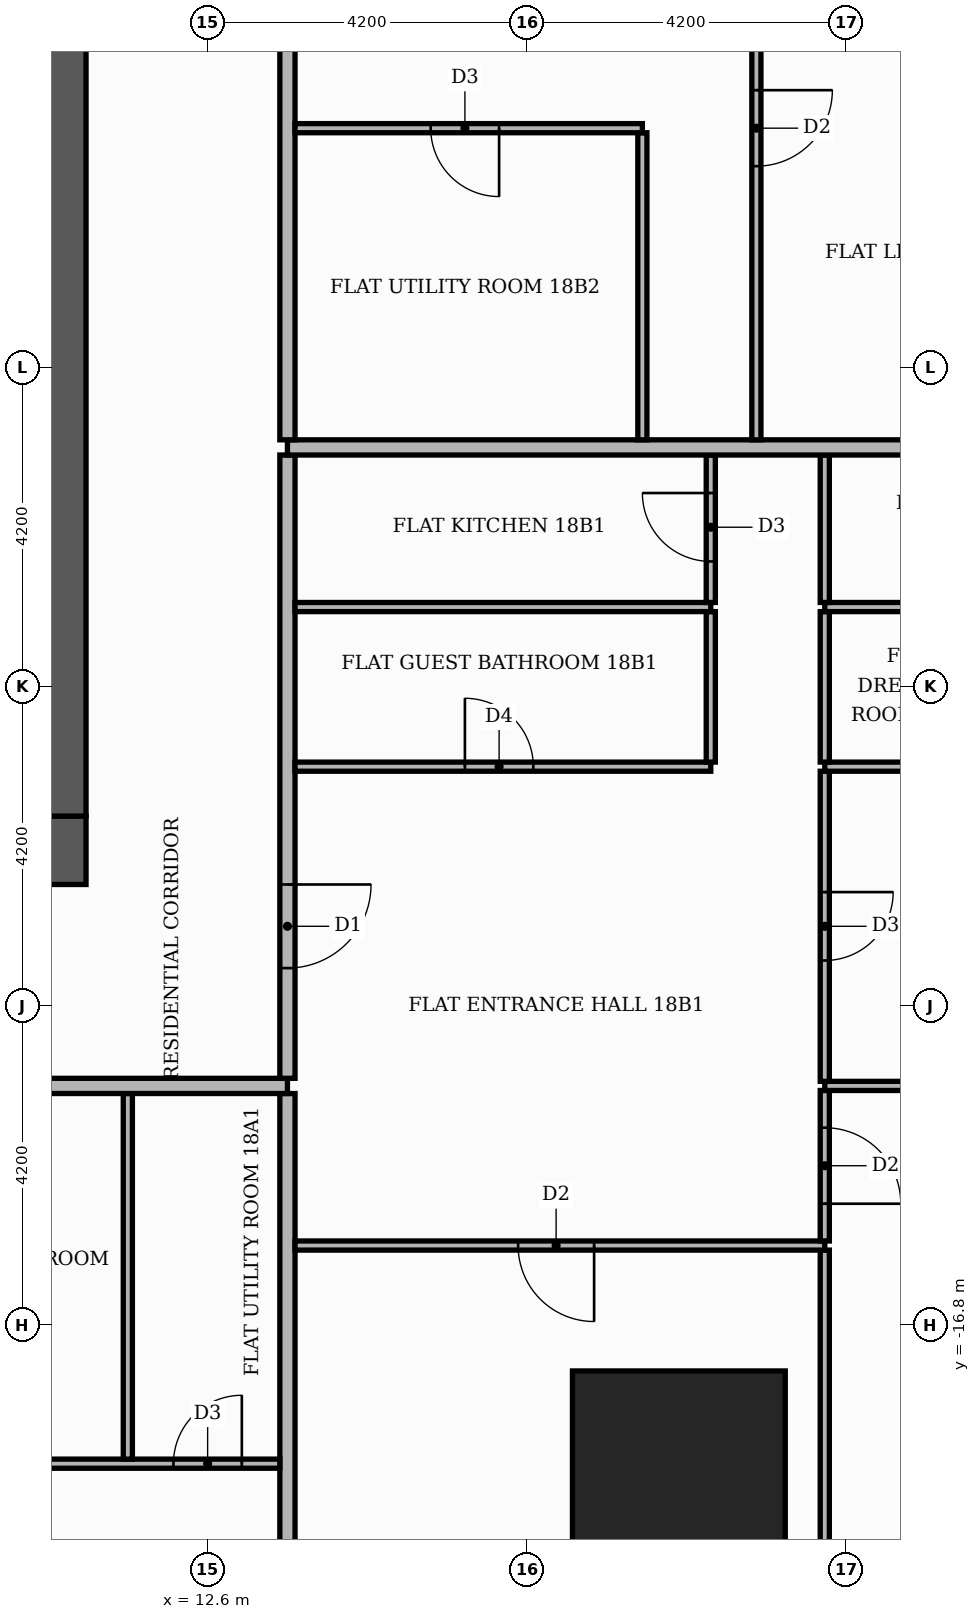
"""IFC4 building model, lengths in metres.
Left out: names, types, materials, properties, quantities, classifications, styles, units other than length and angle.
Written with IfcOpenShell. Run it as: python <this file> out.ifc"""

import sys

from ifc_helpers import new_model, si_unit, direction, frame, frame_2d, origin, origin_2d, place, context, subcontext, project, spatial, rectangle, extrude, element, fill, save


model = new_model("IFC4")
c1 = context("Model", 3, precision=1e-05, world=origin(), true_north=direction((0.0, 1.0)))
c2 = subcontext(c1, "Body", "Model", "MODEL_VIEW")
j1 = project(units=[si_unit("LENGTHUNIT", "METRE"), si_unit("PLANEANGLEUNIT", "RADIAN")], contexts=[c1])
p1 = place(None, origin())
s1 = spatial("IfcSite", under=j1, at=p1, CompositionType="ELEMENT")
p2 = place(p1, origin())
s2 = spatial("IfcBuilding", under=s1, at=p2, CompositionType="ELEMENT")
p3 = place(p2, frame((0.0, 0.0, 79.2)))
s3 = spatial("IfcBuildingStorey", under=s2, at=p3, CompositionType="ELEMENT", Elevation=79.2)
p4 = place(p3, frame((-11.0, -10.55, 0.0), z_axis=(0.0, 0.0, 1.0), x_axis=(1.0, 0.0, 0.0)))
e1 = element("IfcWall", 1, at=p4, inside=s3, PredefinedType="SHEAR", context=c2, shape_type="SweptSolid", body=[
    extrude(rectangle(XDim=22.0, YDim=0.9, at=frame_2d((11.0, 0.0))), origin(), (0.0, 0.0, 1.0), 3.48),
])
p5 = place(p4, frame((7.4, 0.0, 0.0)))
e2 = element("IfcOpeningElement", 2, at=p5, cuts=e1, PredefinedType="OPENING", context=c2, shape_type="SweptSolid", body=[
    extrude(rectangle(XDim=1.8, YDim=2.2, at=frame_2d((0.9, 1.1))), frame((0.0, 0.46, 0.0), z_axis=(0.0, -1.0, 0.0), x_axis=(1.0, 0.0, 0.0)), (0.0, 0.0, 1.0), 0.92),
])
p6 = place(p3, frame((10.55, -10.1, 0.0), z_axis=(0.0, 0.0, 1.0), x_axis=(0.0, 1.0, 0.0)))
e3 = element("IfcWall", 3, at=p6, inside=s3, PredefinedType="SHEAR", context=c2, shape_type="SweptSolid", body=[
    extrude(rectangle(XDim=20.2, YDim=0.9, at=frame_2d((10.1, 0.0))), origin(), (0.0, 0.0, 1.0), 3.48),
])
p7 = place(p3, frame((18.8, -18.8, 0.0), z_axis=(0.0, 0.0, 1.0), x_axis=(1.0, 0.0, 0.0)))
e4 = element("IfcColumn", 4, at=p7, inside=s3, PredefinedType="COLUMN", context=c2, shape_type="SweptSolid", body=[
    extrude(rectangle(XDim=2.8, YDim=2.8, at=origin_2d()), origin(), (0.0, 0.0, 1.0), 3.9),
])
p8 = place(p3, frame((13.65, -25.42, 0.0), z_axis=(0.0, 0.0, 1.0), x_axis=(0.0, 1.0, 0.0)))
e5 = element("IfcWall", 5, at=p8, inside=s3, PredefinedType="PARTITIONING", context=c2, shape_type="SweptSolid", body=[
    extrude(rectangle(XDim=11.67, YDim=0.2, at=frame_2d((5.835, 0.0))), origin(), (0.0, 0.0, 1.0), 3.48),
])
p9 = place(p3, frame((20.72, -25.42, 0.0), z_axis=(0.0, 0.0, 1.0), x_axis=(0.0, 1.0, 0.0)))
e6 = element("IfcWall", 6, at=p9, inside=s3, PredefinedType="PARTITIONING", context=c2, shape_type="SweptSolid", body=[
    extrude(rectangle(XDim=9.61, YDim=0.12, at=frame_2d((4.805, 0.0))), origin(), (0.0, 0.0, 1.0), 3.48),
])
p10 = place(p3, frame((-9.45, -18.62, 0.0), z_axis=(0.0, 0.0, 1.0), x_axis=(1.0, 0.0, 0.0)))
e7 = element("IfcWall", 7, at=p10, inside=s3, PredefinedType="PARTITIONING", context=c2, shape_type="SweptSolid", body=[
    extrude(rectangle(XDim=23.0, YDim=0.12, at=frame_2d((11.5, 0.0))), origin(), (0.0, 0.0, 1.0), 3.48),
])
p11 = place(p10, frame((2.7, 0.0, 0.0)))
e8 = element("IfcOpeningElement", 8, at=p11, cuts=e7, PredefinedType="OPENING", context=c2, shape_type="SweptSolid", body=[
    extrude(rectangle(XDim=0.9, YDim=2.1, at=frame_2d((0.45, 1.05))), frame((0.0, 0.07, 0.0), z_axis=(0.0, -1.0, 0.0), x_axis=(1.0, 0.0, 0.0)), (0.0, 0.0, 1.0), 0.14),
])
p12 = place(p10, frame((7.95, 0.0, 0.0)))
e9 = element("IfcOpeningElement", 9, at=p12, cuts=e7, PredefinedType="OPENING", context=c2, shape_type="SweptSolid", body=[
    extrude(rectangle(XDim=0.9, YDim=2.1, at=frame_2d((0.45, 1.05))), frame((0.0, 0.07, 0.0), z_axis=(0.0, -1.0, 0.0), x_axis=(1.0, 0.0, 0.0)), (0.0, 0.0, 1.0), 0.14),
])
p13 = place(p10, frame((11.1, 0.0, 0.0)))
e10 = element("IfcOpeningElement", 10, at=p13, cuts=e7, PredefinedType="OPENING", context=c2, shape_type="SweptSolid", body=[
    extrude(rectangle(XDim=0.9, YDim=2.1, at=frame_2d((0.45, 1.05))), frame((0.0, 0.07, 0.0), z_axis=(0.0, -1.0, 0.0), x_axis=(1.0, 0.0, 0.0)), (0.0, 0.0, 1.0), 0.14),
])
p14 = place(p10, frame((14.4, 0.0, 0.0)))
e11 = element("IfcOpeningElement", 11, at=p14, cuts=e7, PredefinedType="OPENING", context=c2, shape_type="SweptSolid", body=[
    extrude(rectangle(XDim=0.9, YDim=2.1, at=frame_2d((0.45, 1.05))), frame((0.0, 0.07, 0.0), z_axis=(0.0, -1.0, 0.0), x_axis=(1.0, 0.0, 0.0)), (0.0, 0.0, 1.0), 0.14),
])
p15 = place(p10, frame((18.6, 0.0, 0.0)))
e12 = element("IfcOpeningElement", 12, at=p15, cuts=e7, PredefinedType="OPENING", context=c2, shape_type="SweptSolid", body=[
    extrude(rectangle(XDim=0.9, YDim=2.1, at=frame_2d((0.45, 1.05))), frame((0.0, 0.07, 0.0), z_axis=(0.0, -1.0, 0.0), x_axis=(1.0, 0.0, 0.0)), (0.0, 0.0, 1.0), 0.14),
])
p16 = place(p10, frame((21.6, 0.0, 0.0)))
e13 = element("IfcOpeningElement", 13, at=p16, cuts=e7, PredefinedType="OPENING", context=c2, shape_type="SweptSolid", body=[
    extrude(rectangle(XDim=0.9, YDim=2.1, at=frame_2d((0.45, 1.05))), frame((0.0, 0.07, 0.0), z_axis=(0.0, -1.0, 0.0), x_axis=(1.0, 0.0, 0.0)), (0.0, 0.0, 1.0), 0.14),
])
p17 = place(p3, frame((11.55, -18.56, 0.0), z_axis=(0.0, 0.0, 1.0), x_axis=(0.0, 1.0, 0.0)))
e14 = element("IfcWall", 14, at=p17, inside=s3, PredefinedType="PARTITIONING", context=c2, shape_type="SweptSolid", body=[
    extrude(rectangle(XDim=4.81, YDim=0.12, at=frame_2d((2.405, 0.0))), origin(), (0.0, 0.0, 1.0), 3.48),
])
p18 = place(p3, frame((13.75, -15.75, 0.0), z_axis=(0.0, 0.0, 1.0), x_axis=(1.0, 0.0, 0.0)))
e15 = element("IfcWall", 15, at=p18, inside=s3, PredefinedType="PARTITIONING", context=c2, shape_type="SweptSolid", body=[
    extrude(rectangle(XDim=6.97, YDim=0.12, at=frame_2d((3.485, 0.0))), origin(), (0.0, 0.0, 1.0), 3.48),
])
p19 = place(p18, frame((2.935, 0.0, 0.0)))
e16 = element("IfcOpeningElement", 16, at=p19, cuts=e15, PredefinedType="OPENING", context=c2, shape_type="SweptSolid", body=[
    extrude(rectangle(XDim=1.0, YDim=2.1, at=frame_2d((0.5, 1.05))), frame((0.0, 0.07, 0.0), z_axis=(0.0, -1.0, 0.0), x_axis=(1.0, 0.0, 0.0)), (0.0, 0.0, 1.0), 0.14),
])
p20 = place(p3, frame((20.72, -15.69, 0.0), z_axis=(0.0, 0.0, 1.0), x_axis=(0.0, 1.0, 0.0)))
e17 = element("IfcWall", 17, at=p20, inside=s3, PredefinedType="PARTITIONING", context=c2, shape_type="SweptSolid", body=[
    extrude(rectangle(XDim=1.98, YDim=0.12, at=frame_2d((0.99, 0.0))), origin(), (0.0, 0.0, 1.0), 3.48),
])
p21 = place(p20, frame((0.49, 0.0, 0.0)))
e18 = element("IfcOpeningElement", 18, at=p21, cuts=e17, PredefinedType="OPENING", context=c2, shape_type="SweptSolid", body=[
    extrude(rectangle(XDim=1.0, YDim=2.1, at=frame_2d((0.5, 1.05))), frame((0.0, 0.07, 0.0), z_axis=(0.0, -1.0, 0.0), x_axis=(1.0, 0.0, 0.0)), (0.0, 0.0, 1.0), 0.14),
])
p22 = place(p3, frame((-25.42, -13.65, 0.0), z_axis=(0.0, 0.0, 1.0), x_axis=(1.0, 0.0, 0.0)))
e19 = element("IfcWall", 19, at=p22, inside=s3, PredefinedType="PARTITIONING", context=c2, shape_type="SweptSolid", body=[
    extrude(rectangle(XDim=39.07, YDim=0.2, at=frame_2d((19.535, 0.0))), origin(), (0.0, 0.0, 1.0), 3.48),
])
p23 = place(p22, frame((13.32, 0.0, 0.0)))
e20 = element("IfcOpeningElement", 20, at=p23, cuts=e19, PredefinedType="OPENING", context=c2, shape_type="SweptSolid", body=[
    extrude(rectangle(XDim=1.1, YDim=2.4, at=frame_2d((0.55, 1.2))), frame((0.0, 0.11, 0.0), z_axis=(0.0, -1.0, 0.0), x_axis=(1.0, 0.0, 0.0)), (0.0, 0.0, 1.0), 0.22),
])
p24 = place(p3, frame((20.72, -13.65, 0.0), z_axis=(0.0, 0.0, 1.0), x_axis=(1.0, 0.0, 0.0)))
e21 = element("IfcWall", 21, at=p24, inside=s3, PredefinedType="PARTITIONING", context=c2, shape_type="SweptSolid", body=[
    extrude(rectangle(XDim=4.7, YDim=0.12, at=frame_2d((2.35, 0.0))), origin(), (0.0, 0.0, 1.0), 3.48),
])
p25 = place(p3, frame((20.72, -13.59, 0.0), z_axis=(0.0, 0.0, 1.0), x_axis=(0.0, 1.0, 0.0)))
e22 = element("IfcWall", 22, at=p25, inside=s3, PredefinedType="PARTITIONING", context=c2, shape_type="SweptSolid", body=[
    extrude(rectangle(XDim=4.08, YDim=0.12, at=frame_2d((2.04, 0.0))), origin(), (0.0, 0.0, 1.0), 3.48),
])
p26 = place(p25, frame((1.59, 0.0, 0.0)))
e23 = element("IfcOpeningElement", 23, at=p26, cuts=e22, PredefinedType="OPENING", context=c2, shape_type="SweptSolid", body=[
    extrude(rectangle(XDim=0.9, YDim=2.1, at=frame_2d((0.45, 1.05))), frame((0.0, 0.07, 0.0), z_axis=(0.0, -1.0, 0.0), x_axis=(1.0, 0.0, 0.0)), (0.0, 0.0, 1.0), 0.14),
])
p27 = place(p3, frame((13.65, -13.55, 0.0), z_axis=(0.0, 0.0, 1.0), x_axis=(0.0, 1.0, 0.0)))
e24 = element("IfcWall", 24, at=p27, inside=s3, PredefinedType="PARTITIONING", context=c2, shape_type="SweptSolid", body=[
    extrude(rectangle(XDim=8.2, YDim=0.2, at=frame_2d((4.1, 0.0))), origin(), (0.0, 0.0, 1.0), 3.48),
])
p28 = place(p27, frame((1.45, 0.0, 0.0)))
e25 = element("IfcOpeningElement", 25, at=p28, cuts=e24, PredefinedType="OPENING", context=c2, shape_type="SweptSolid", body=[
    extrude(rectangle(XDim=1.1, YDim=2.4, at=frame_2d((0.55, 1.2))), frame((0.0, 0.11, 0.0), z_axis=(0.0, -1.0, 0.0), x_axis=(1.0, 0.0, 0.0)), (0.0, 0.0, 1.0), 0.22),
])
p29 = place(p3, frame((13.75, -9.45, 0.0), z_axis=(0.0, 0.0, 1.0), x_axis=(1.0, 0.0, 0.0)))
e26 = element("IfcWall", 26, at=p29, inside=s3, PredefinedType="PARTITIONING", context=c2, shape_type="SweptSolid", body=[
    extrude(rectangle(XDim=5.47, YDim=0.12, at=frame_2d((2.735, 0.0))), origin(), (0.0, 0.0, 1.0), 3.48),
])
p30 = place(p29, frame((2.235, 0.0, 0.0)))
e27 = element("IfcOpeningElement", 27, at=p30, cuts=e26, PredefinedType="OPENING", context=c2, shape_type="SweptSolid", body=[
    extrude(rectangle(XDim=0.9, YDim=2.1, at=frame_2d((0.45, 1.05))), frame((0.0, 0.07, 0.0), z_axis=(0.0, -1.0, 0.0), x_axis=(1.0, 0.0, 0.0)), (0.0, 0.0, 1.0), 0.14),
])
p31 = place(p3, frame((20.72, -9.45, 0.0), z_axis=(0.0, 0.0, 1.0), x_axis=(1.0, 0.0, 0.0)))
e28 = element("IfcWall", 28, at=p31, inside=s3, PredefinedType="PARTITIONING", context=c2, shape_type="SweptSolid", body=[
    extrude(rectangle(XDim=4.7, YDim=0.12, at=frame_2d((2.35, 0.0))), origin(), (0.0, 0.0, 1.0), 3.48),
])
p32 = place(p31, frame((2.05, 0.0, 0.0)))
e29 = element("IfcOpeningElement", 29, at=p32, cuts=e28, PredefinedType="OPENING", context=c2, shape_type="SweptSolid", body=[
    extrude(rectangle(XDim=0.9, YDim=2.1, at=frame_2d((0.45, 1.05))), frame((0.0, 0.07, 0.0), z_axis=(0.0, -1.0, 0.0), x_axis=(1.0, 0.0, 0.0)), (0.0, 0.0, 1.0), 0.14),
])
for number, where, z_axis, x_axis in (
    (30, (19.22, -9.39, 0.0), (0.0, 0.0, 1.0), (0.0, 1.0, 0.0)),
    (31, (20.72, -9.39, 0.0), (0.0, 0.0, 1.0), (0.0, 1.0, 0.0)),
):
    element("IfcWall", number, at=place(p3, frame(where, z_axis=z_axis, x_axis=x_axis)), inside=s3, PredefinedType="PARTITIONING", context=c2, shape_type="SweptSolid", body=[
        extrude(rectangle(XDim=1.98, YDim=0.12, at=frame_2d((0.99, 0.0))), origin(), (0.0, 0.0, 1.0), 3.48),
    ])
p33 = place(p3, frame((13.75, -7.35, 0.0), z_axis=(0.0, 0.0, 1.0), x_axis=(1.0, 0.0, 0.0)))
e32 = element("IfcWall", 32, at=p33, inside=s3, PredefinedType="PARTITIONING", context=c2, shape_type="SweptSolid", body=[
    extrude(rectangle(XDim=5.47, YDim=0.12, at=frame_2d((2.735, 0.0))), origin(), (0.0, 0.0, 1.0), 3.48),
])
p34 = place(p3, frame((20.72, -7.35, 0.0), z_axis=(0.0, 0.0, 1.0), x_axis=(1.0, 0.0, 0.0)))
e33 = element("IfcWall", 33, at=p34, inside=s3, PredefinedType="PARTITIONING", context=c2, shape_type="SweptSolid", body=[
    extrude(rectangle(XDim=4.7, YDim=0.12, at=frame_2d((2.35, 0.0))), origin(), (0.0, 0.0, 1.0), 3.48),
])
p35 = place(p34, frame((2.05, 0.0, 0.0)))
e34 = element("IfcOpeningElement", 34, at=p35, cuts=e33, PredefinedType="OPENING", context=c2, shape_type="SweptSolid", body=[
    extrude(rectangle(XDim=0.9, YDim=2.1, at=frame_2d((0.45, 1.05))), frame((0.0, 0.07, 0.0), z_axis=(0.0, -1.0, 0.0), x_axis=(1.0, 0.0, 0.0)), (0.0, 0.0, 1.0), 0.14),
])
p36 = place(p3, frame((19.22, -7.29, 0.0), z_axis=(0.0, 0.0, 1.0), x_axis=(0.0, 1.0, 0.0)))
e35 = element("IfcWall", 35, at=p36, inside=s3, PredefinedType="PARTITIONING", context=c2, shape_type="SweptSolid", body=[
    extrude(rectangle(XDim=1.94, YDim=0.12, at=frame_2d((0.97, 0.0))), origin(), (0.0, 0.0, 1.0), 3.48),
])
p37 = place(p36, frame((0.54, 0.0, 0.0)))
e36 = element("IfcOpeningElement", 36, at=p37, cuts=e35, PredefinedType="OPENING", context=c2, shape_type="SweptSolid", body=[
    extrude(rectangle(XDim=0.9, YDim=2.1, at=frame_2d((0.45, 1.05))), frame((0.0, 0.07, 0.0), z_axis=(0.0, -1.0, 0.0), x_axis=(1.0, 0.0, 0.0)), (0.0, 0.0, 1.0), 0.14),
])
p38 = place(p3, frame((20.72, -7.29, 0.0), z_axis=(0.0, 0.0, 1.0), x_axis=(0.0, 1.0, 0.0)))
e37 = element("IfcWall", 37, at=p38, inside=s3, PredefinedType="PARTITIONING", context=c2, shape_type="SweptSolid", body=[
    extrude(rectangle(XDim=1.94, YDim=0.12, at=frame_2d((0.97, 0.0))), origin(), (0.0, 0.0, 1.0), 3.48),
])
p39 = place(p3, frame((13.65, -5.25, 0.0), z_axis=(0.0, 0.0, 1.0), x_axis=(1.0, 0.0, 0.0)))
e38 = element("IfcWall", 38, at=p39, inside=s3, PredefinedType="PARTITIONING", context=c2, shape_type="SweptSolid", body=[
    extrude(rectangle(XDim=11.77, YDim=0.2, at=frame_2d((5.885, 0.0))), origin(), (0.0, 0.0, 1.0), 3.48),
])
p40 = place(p3, frame((13.65, -5.15, 0.0), z_axis=(0.0, 0.0, 1.0), x_axis=(0.0, 1.0, 0.0)))
e39 = element("IfcWall", 39, at=p40, inside=s3, PredefinedType="PARTITIONING", context=c2, shape_type="SweptSolid", body=[
    extrude(rectangle(XDim=18.7, YDim=0.2, at=frame_2d((9.35, 0.0))), origin(), (0.0, 0.0, 1.0), 3.48),
])
p41 = place(p40, frame((5.65, 0.0, 0.0)))
e40 = element("IfcOpeningElement", 40, at=p41, cuts=e39, PredefinedType="OPENING", context=c2, shape_type="SweptSolid", body=[
    extrude(rectangle(XDim=1.1, YDim=2.4, at=frame_2d((0.55, 1.2))), frame((0.0, 0.11, 0.0), z_axis=(0.0, -1.0, 0.0), x_axis=(1.0, 0.0, 0.0)), (0.0, 0.0, 1.0), 0.22),
])
p42 = place(p3, frame((18.32, -5.15, 0.0), z_axis=(0.0, 0.0, 1.0), x_axis=(0.0, 1.0, 0.0)))
e41 = element("IfcWall", 41, at=p42, inside=s3, PredefinedType="PARTITIONING", context=c2, shape_type="SweptSolid", body=[
    extrude(rectangle(XDim=4.04, YDim=0.12, at=frame_2d((2.02, 0.0))), origin(), (0.0, 0.0, 1.0), 3.48),
])
p43 = place(p3, frame((19.82, -5.15, 0.0), z_axis=(0.0, 0.0, 1.0), x_axis=(0.0, 1.0, 0.0)))
e42 = element("IfcWall", 42, at=p43, inside=s3, PredefinedType="PARTITIONING", context=c2, shape_type="SweptSolid", body=[
    extrude(rectangle(XDim=8.24, YDim=0.12, at=frame_2d((4.12, 0.0))), origin(), (0.0, 0.0, 1.0), 3.48),
])
p44 = place(p43, frame((3.6, 0.0, 0.0)))
e43 = element("IfcOpeningElement", 43, at=p44, cuts=e42, PredefinedType="OPENING", context=c2, shape_type="SweptSolid", body=[
    extrude(rectangle(XDim=1.0, YDim=2.1, at=frame_2d((0.5, 1.05))), frame((0.0, 0.07, 0.0), z_axis=(0.0, -1.0, 0.0), x_axis=(1.0, 0.0, 0.0)), (0.0, 0.0, 1.0), 0.14),
])
p45 = place(p3, frame((13.75, -1.05, 0.0), z_axis=(0.0, 0.0, 1.0), x_axis=(1.0, 0.0, 0.0)))
e44 = element("IfcWall", 44, at=p45, inside=s3, PredefinedType="PARTITIONING", context=c2, shape_type="SweptSolid", body=[
    extrude(rectangle(XDim=4.57, YDim=0.12, at=frame_2d((2.285, 0.0))), origin(), (0.0, 0.0, 1.0), 3.48),
])
p46 = place(p45, frame((1.785, 0.0, 0.0)))
e45 = element("IfcOpeningElement", 45, at=p46, cuts=e44, PredefinedType="OPENING", context=c2, shape_type="SweptSolid", body=[
    extrude(rectangle(XDim=0.9, YDim=2.1, at=frame_2d((0.45, 1.05))), frame((0.0, 0.07, 0.0), z_axis=(0.0, -1.0, 0.0), x_axis=(1.0, 0.0, 0.0)), (0.0, 0.0, 1.0), 0.14),
])
p47 = place(p16, origin())
e46 = element("IfcDoor", 46, at=p47, inside=s3, OperationType="SINGLE_SWING_RIGHT", PredefinedType="DOOR", context=c2, shape_type="SweptSolid", body=[
    extrude(rectangle(XDim=0.9, YDim=2.1, at=frame_2d((0.45, 1.05))), frame((0.0, 0.025, 0.0), z_axis=(0.0, -1.0, 0.0), x_axis=(1.0, 0.0, 0.0)), (0.0, 0.0, 1.0), 0.05),
])
fill(e13, e46)
p48 = place(p28, frame((1.1, 0.0, 0.0), z_axis=(0.0, 0.0, 1.0), x_axis=(-1.0, 0.0, 0.0)))
e47 = element("IfcDoor", 47, at=p48, inside=s3, OperationType="SINGLE_SWING_RIGHT", PredefinedType="DOOR", context=c2, shape_type="SweptSolid", body=[
    extrude(rectangle(XDim=1.1, YDim=2.4, at=frame_2d((0.55, 1.2))), frame((0.0, 0.025, 0.0), z_axis=(0.0, -1.0, 0.0), x_axis=(1.0, 0.0, 0.0)), (0.0, 0.0, 1.0), 0.05),
])
fill(e25, e47)
p49 = place(p19, frame((1.0, 0.0, 0.0), z_axis=(0.0, 0.0, 1.0), x_axis=(-1.0, 0.0, 0.0)))
e48 = element("IfcDoor", 48, at=p49, inside=s3, OperationType="SINGLE_SWING_RIGHT", PredefinedType="DOOR", context=c2, shape_type="SweptSolid", body=[
    extrude(rectangle(XDim=1.0, YDim=2.1, at=frame_2d((0.5, 1.05))), frame((0.0, 0.025, 0.0), z_axis=(0.0, -1.0, 0.0), x_axis=(1.0, 0.0, 0.0)), (0.0, 0.0, 1.0), 0.05),
])
fill(e16, e48)
p50 = place(p30, origin())
e49 = element("IfcDoor", 49, at=p50, inside=s3, OperationType="SINGLE_SWING_LEFT", PredefinedType="DOOR", context=c2, shape_type="SweptSolid", body=[
    extrude(rectangle(XDim=0.9, YDim=2.1, at=frame_2d((0.45, 1.05))), frame((0.0, 0.025, 0.0), z_axis=(0.0, -1.0, 0.0), x_axis=(1.0, 0.0, 0.0)), (0.0, 0.0, 1.0), 0.05),
])
fill(e27, e49)
p51 = place(p37, origin())
e50 = element("IfcDoor", 50, at=p51, inside=s3, OperationType="SINGLE_SWING_RIGHT", PredefinedType="DOOR", context=c2, shape_type="SweptSolid", body=[
    extrude(rectangle(XDim=0.9, YDim=2.1, at=frame_2d((0.45, 1.05))), frame((0.0, 0.025, 0.0), z_axis=(0.0, -1.0, 0.0), x_axis=(1.0, 0.0, 0.0)), (0.0, 0.0, 1.0), 0.05),
])
fill(e36, e50)
p52 = place(p21, frame((1.0, 0.0, 0.0), z_axis=(0.0, 0.0, 1.0), x_axis=(-1.0, 0.0, 0.0)))
e51 = element("IfcDoor", 51, at=p52, inside=s3, OperationType="SINGLE_SWING_LEFT", PredefinedType="DOOR", context=c2, shape_type="SweptSolid", body=[
    extrude(rectangle(XDim=1.0, YDim=2.1, at=frame_2d((0.5, 1.05))), frame((0.0, 0.025, 0.0), z_axis=(0.0, -1.0, 0.0), x_axis=(1.0, 0.0, 0.0)), (0.0, 0.0, 1.0), 0.05),
])
fill(e18, e51)
p53 = place(p26, frame((0.9, 0.0, 0.0), z_axis=(0.0, 0.0, 1.0), x_axis=(-1.0, 0.0, 0.0)))
e52 = element("IfcDoor", 52, at=p53, inside=s3, OperationType="SINGLE_SWING_RIGHT", PredefinedType="DOOR", context=c2, shape_type="SweptSolid", body=[
    extrude(rectangle(XDim=0.9, YDim=2.1, at=frame_2d((0.45, 1.05))), frame((0.0, 0.025, 0.0), z_axis=(0.0, -1.0, 0.0), x_axis=(1.0, 0.0, 0.0)), (0.0, 0.0, 1.0), 0.05),
])
fill(e23, e52)
p54 = place(p46, frame((0.9, 0.0, 0.0), z_axis=(0.0, 0.0, 1.0), x_axis=(-1.0, 0.0, 0.0)))
e53 = element("IfcDoor", 53, at=p54, inside=s3, OperationType="SINGLE_SWING_RIGHT", PredefinedType="DOOR", context=c2, shape_type="SweptSolid", body=[
    extrude(rectangle(XDim=0.9, YDim=2.1, at=frame_2d((0.45, 1.05))), frame((0.0, 0.025, 0.0), z_axis=(0.0, -1.0, 0.0), x_axis=(1.0, 0.0, 0.0)), (0.0, 0.0, 1.0), 0.05),
])
fill(e45, e53)
p55 = place(p44, frame((1.0, 0.0, 0.0), z_axis=(0.0, 0.0, 1.0), x_axis=(-1.0, 0.0, 0.0)))
e54 = element("IfcDoor", 54, at=p55, inside=s3, OperationType="SINGLE_SWING_RIGHT", PredefinedType="DOOR", context=c2, shape_type="SweptSolid", body=[
    extrude(rectangle(XDim=1.0, YDim=2.1, at=frame_2d((0.5, 1.05))), frame((0.0, 0.025, 0.0), z_axis=(0.0, -1.0, 0.0), x_axis=(1.0, 0.0, 0.0)), (0.0, 0.0, 1.0), 0.05),
])
fill(e43, e54)
save(model, sys.argv[1])
